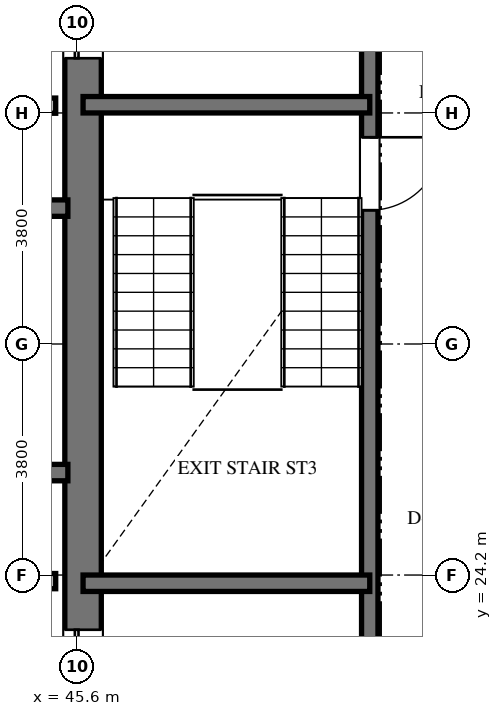
"""IFC4 building model, lengths in metres.
Left out: names, types, materials, properties, quantities, classifications, styles, units other than length and angle.
Written with IfcOpenShell. Run it as: python <this file> out.ifc"""

import sys

from ifc_helpers import new_model, si_unit, direction, frame, frame_2d, origin, place, context, subcontext, project, spatial, rectangle, extrude, element, fill, save


model = new_model("IFC4")
c1 = context("Model", 3, precision=1e-05, world=origin(), true_north=direction((0.0, 1.0)))
c2 = subcontext(c1, "Body", "Model", "MODEL_VIEW")
j1 = project(units=[si_unit("LENGTHUNIT", "METRE"), si_unit("PLANEANGLEUNIT", "RADIAN")], contexts=[c1])
p1 = place(None, origin())
s1 = spatial("IfcSite", under=j1, at=p1, CompositionType="ELEMENT")
p2 = place(p1, origin())
s2 = spatial("IfcBuilding", under=s1, at=p2, CompositionType="ELEMENT")
p3 = place(p2, frame((0.0, 0.0, 171.12)))
s3 = spatial("IfcBuildingStorey", under=s2, at=p3, CompositionType="ELEMENT", Elevation=171.12)
p4 = place(p3, frame((45.7, 20.95, 0.0), z_axis=(0.0, 0.0, 1.0), x_axis=(0.0, 1.0, 0.0)))
e1 = element("IfcWall", 1, at=p4, inside=s3, PredefinedType="SHEAR", context=c2, shape_type="SweptSolid", body=[
    extrude(rectangle(XDim=14.1, YDim=0.6, at=frame_2d((7.05, 0.0))), origin(), (0.0, 0.0, 1.0), 3.648),
])
p5 = place(p4, frame((11.75, 0.0, 0.0)))
e2 = element("IfcOpeningElement", 2, at=p5, cuts=e1, PredefinedType="OPENING", context=c2, shape_type="SweptSolid", body=[
    extrude(rectangle(XDim=1.4, YDim=2.3, at=frame_2d((0.7, 1.15))), frame((0.0, 0.31, 0.0), z_axis=(0.0, -1.0, 0.0), x_axis=(1.0, 0.0, 0.0)), (0.0, 0.0, 1.0), 0.62),
])
p6 = place(p4, frame((0.95, 0.0, 0.0)))
e3 = element("IfcOpeningElement", 3, at=p6, cuts=e1, PredefinedType="OPENING", context=c2, shape_type="SweptSolid", body=[
    extrude(rectangle(XDim=1.4, YDim=2.3, at=frame_2d((0.7, 1.15))), frame((0.0, 0.31, 0.0), z_axis=(0.0, -1.0, 0.0), x_axis=(1.0, 0.0, 0.0)), (0.0, 0.0, 1.0), 0.62),
])
p7 = place(p3, frame((37.465, 30.235, 0.0), z_axis=(0.0, 0.0, 1.0), x_axis=(1.0, 0.0, 0.0)))
e4 = element("IfcWall", 4, at=p7, inside=s3, PredefinedType="SHEAR", context=c2, shape_type="SweptSolid", body=[
    extrude(rectangle(XDim=7.985, YDim=0.27, at=frame_2d((3.992, 0.0))), origin(), (0.0, 0.0, 1.0), 3.648),
])
p8 = place(p7, frame((6.455, 0.0, 0.0)))
e5 = element("IfcOpeningElement", 5, at=p8, cuts=e4, PredefinedType="OPENING", context=c2, shape_type="SweptSolid", body=[
    extrude(rectangle(XDim=1.2, YDim=2.15, at=frame_2d((0.6, 1.075))), frame((0.0, 0.145, 0.0), z_axis=(0.0, -1.0, 0.0), x_axis=(1.0, 0.0, 0.0)), (0.0, 0.0, 1.0), 0.29),
])
p9 = place(p3, frame((37.465, 25.885, 0.0), z_axis=(0.0, 0.0, 1.0), x_axis=(1.0, 0.0, 0.0)))
e6 = element("IfcWall", 6, at=p9, inside=s3, PredefinedType="SHEAR", context=c2, shape_type="SweptSolid", body=[
    extrude(rectangle(XDim=7.985, YDim=0.27, at=frame_2d((3.992, 0.0))), origin(), (0.0, 0.0, 1.0), 3.648),
])
for number, where, z_axis, x_axis in (
    (7, (42.95, 31.92, 0.0), (0.0, 0.0, 1.0), (1.0, 0.0, 0.0)),
    (8, (42.95, 24.1, 0.0), (0.0, 0.0, 1.0), (1.0, 0.0, 0.0)),
):
    element("IfcWall", number, at=place(p3, frame(where, z_axis=z_axis, x_axis=x_axis)), inside=s3, PredefinedType="SOLIDWALL", context=c2, shape_type="SweptSolid", body=[
        extrude(rectangle(XDim=2.3, YDim=0.25, at=frame_2d((1.15, 0.0))), origin(), (0.0, 0.0, 1.0), 3.428),
    ])
p10 = place(p3, frame((50.415, 35.845, 0.0), z_axis=(0.0, 0.0, 1.0), x_axis=(0.0, -1.0, 0.0)))
e9 = element("IfcWall", 9, at=p10, inside=s3, PredefinedType="SHEAR", context=c2, shape_type="SweptSolid", body=[
    extrude(rectangle(XDim=15.825, YDim=0.27, at=frame_2d((7.913, 0.0))), origin(), (0.0, 0.0, 1.0), 3.648),
])
p11 = place(p10, frame((4.445, 0.0, 0.0)))
e10 = element("IfcOpeningElement", 10, at=p11, cuts=e9, PredefinedType="OPENING", context=c2, shape_type="SweptSolid", body=[
    extrude(rectangle(XDim=1.2, YDim=2.15, at=frame_2d((0.6, 1.075))), frame((0.0, 0.145, 0.0), z_axis=(0.0, -1.0, 0.0), x_axis=(1.0, 0.0, 0.0)), (0.0, 0.0, 1.0), 0.29),
])
p12 = place(p10, frame((1.295, 0.0, 0.0)))
e11 = element("IfcOpeningElement", 11, at=p12, cuts=e9, PredefinedType="OPENING", context=c2, shape_type="SweptSolid", body=[
    extrude(rectangle(XDim=1.3, YDim=2.2, at=frame_2d((0.65, 1.1))), frame((0.0, 0.145, 0.0), z_axis=(0.0, -1.0, 0.0), x_axis=(1.0, 0.0, 0.0)), (0.0, 0.0, 1.0), 0.29),
])
p13 = place(p10, frame((13.095, 0.0, 0.0)))
e12 = element("IfcOpeningElement", 12, at=p13, cuts=e9, PredefinedType="OPENING", context=c2, shape_type="SweptSolid", body=[
    extrude(rectangle(XDim=1.3, YDim=2.2, at=frame_2d((0.65, 1.1))), frame((0.0, 0.145, 0.0), z_axis=(0.0, -1.0, 0.0), x_axis=(1.0, 0.0, 0.0)), (0.0, 0.0, 1.0), 0.29),
])
for number, where, z_axis, x_axis in (
    (13, (45.7, 31.935, 0.0), (0.0, 0.0, 1.0), (1.0, 0.0, 0.0)),
    (14, (45.7, 24.065, 0.0), (0.0, 0.0, 1.0), (1.0, 0.0, 0.0)),
):
    element("IfcWall", number, at=place(p3, frame(where, z_axis=z_axis, x_axis=x_axis)), inside=s3, PredefinedType="SHEAR", context=c2, shape_type="SweptSolid", body=[
        extrude(rectangle(XDim=4.715, YDim=0.27, at=frame_2d((2.357, 0.0))), origin(), (0.0, 0.0, 1.0), 3.648),
    ])
p14 = place(p5, origin())
e15 = element("IfcDoor", 15, at=p14, inside=s3, OperationType="SLIDING_TO_LEFT", PredefinedType="DOOR", context=c2, shape_type="SweptSolid", body=[
    extrude(rectangle(XDim=1.4, YDim=2.3, at=frame_2d((0.7, 1.15))), frame((0.0, 0.025, 0.0), z_axis=(0.0, -1.0, 0.0), x_axis=(1.0, 0.0, 0.0)), (0.0, 0.0, 1.0), 0.05),
])
fill(e2, e15)
p15 = place(p6, origin())
e16 = element("IfcDoor", 16, at=p15, inside=s3, OperationType="SLIDING_TO_LEFT", PredefinedType="DOOR", context=c2, shape_type="SweptSolid", body=[
    extrude(rectangle(XDim=1.4, YDim=2.3, at=frame_2d((0.7, 1.15))), frame((0.0, 0.025, 0.0), z_axis=(0.0, -1.0, 0.0), x_axis=(1.0, 0.0, 0.0)), (0.0, 0.0, 1.0), 0.05),
])
fill(e3, e16)
p16 = place(p11, origin())
e17 = element("IfcDoor", 17, at=p16, inside=s3, OperationType="SINGLE_SWING_LEFT", PredefinedType="DOOR", context=c2, shape_type="SweptSolid", body=[
    extrude(rectangle(XDim=1.2, YDim=2.15, at=frame_2d((0.6, 1.075))), frame((0.0, 0.025, 0.0), z_axis=(0.0, -1.0, 0.0), x_axis=(1.0, 0.0, 0.0)), (0.0, 0.0, 1.0), 0.05),
])
fill(e10, e17)
save(model, sys.argv[1])
